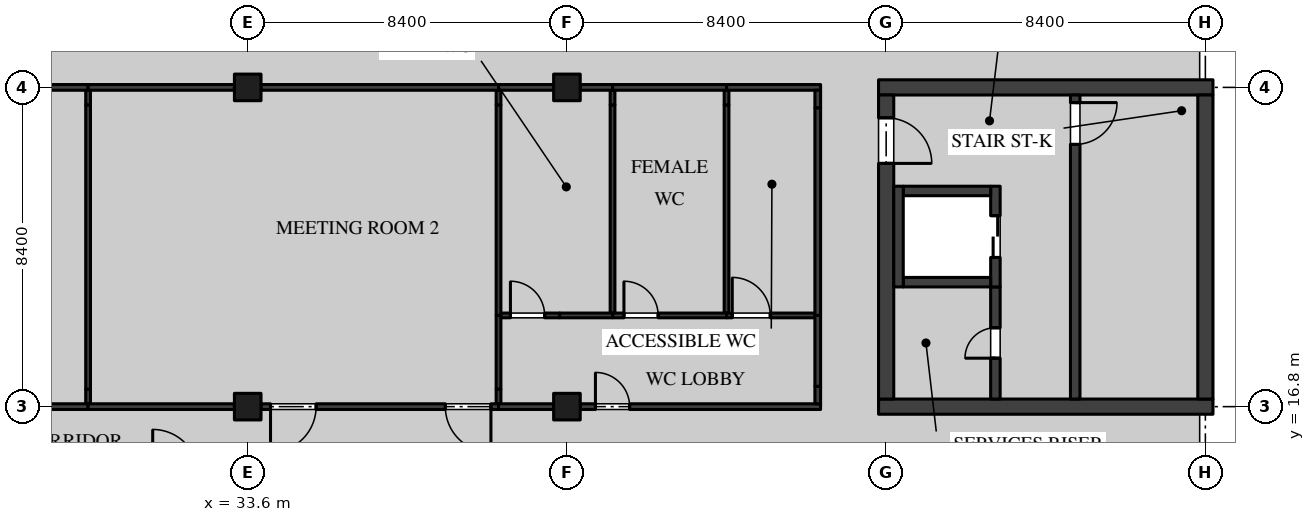
"""IFC4 building model, lengths in metres.
Left out: names, types, materials, properties, quantities, classifications, styles, units other than length and angle.
Written with IfcOpenShell. Run it as: python <this file> out.ifc"""

import sys

from ifc_helpers import new_model, si_unit, direction, frame, frame_2d, origin, origin_2d, place, context, subcontext, project, spatial, rectangle, extrude, element, fill, save


model = new_model("IFC4")
c1 = context("Model", 3, precision=1e-05, world=origin(), true_north=direction((0.0, 1.0)))
c2 = subcontext(c1, "Body", "Model", "MODEL_VIEW")
j1 = project(units=[si_unit("LENGTHUNIT", "METRE"), si_unit("PLANEANGLEUNIT", "RADIAN")], contexts=[c1])
p1 = place(None, origin())
s1 = spatial("IfcSite", under=j1, at=p1, CompositionType="ELEMENT")
p2 = place(p1, origin())
s2 = spatial("IfcBuilding", under=s1, at=p2, CompositionType="ELEMENT")
p3 = place(p2, frame((0.0, 0.0, 5.4)))
s3 = spatial("IfcBuildingStorey", under=s2, at=p3, CompositionType="ELEMENT", Elevation=5.4)
for number, where, z_axis, x_axis in (
    (1, (33.6, 16.8, 0.0), (0.0, 0.0, 1.0), (1.0, 0.0, 0.0)),
    (2, (33.6, 25.2, 0.0), (0.0, 0.0, 1.0), (1.0, 0.0, 0.0)),
    (3, (42.0, 16.8, 0.0), (0.0, 0.0, 1.0), (1.0, 0.0, 0.0)),
    (4, (42.0, 25.2, 0.0), (0.0, 0.0, 1.0), (1.0, 0.0, 0.0)),
):
    element("IfcColumn", number, at=place(p3, frame(where, z_axis=z_axis, x_axis=x_axis)), inside=s3, PredefinedType="COLUMN", context=c2, shape_type="SweptSolid", body=[
        extrude(rectangle(XDim=0.7, YDim=0.7, at=origin_2d()), origin(), (0.0, 0.0, 1.0), 4.37),
    ])
for number, where, z_axis, x_axis in (
    (5, (50.2, 16.8, 0.0), (0.0, 0.0, 1.0), (1.0, 0.0, 0.0)),
    (6, (50.2, 25.2, 0.0), (0.0, 0.0, 1.0), (1.0, 0.0, 0.0)),
):
    element("IfcWall", number, at=place(p3, frame(where, z_axis=z_axis, x_axis=x_axis)), inside=s3, PredefinedType="SHEAR", context=c2, shape_type="SweptSolid", body=[
        extrude(rectangle(XDim=8.8, YDim=0.4, at=frame_2d((4.4, 0.0))), origin(), (0.0, 0.0, 1.0), 4.37),
    ])
p4 = place(p3, frame((50.4, 17.0, 0.0), z_axis=(0.0, 0.0, 1.0), x_axis=(0.0, 1.0, 0.0)))
e7 = element("IfcWall", 7, at=p4, inside=s3, PredefinedType="SHEAR", context=c2, shape_type="SweptSolid", body=[
    extrude(rectangle(XDim=8.0, YDim=0.4, at=frame_2d((4.0, 0.0))), origin(), (0.0, 0.0, 1.0), 4.37),
])
p5 = place(p4, frame((6.2, 0.0, 0.0)))
e8 = element("IfcOpeningElement", 8, at=p5, cuts=e7, PredefinedType="OPENING", context=c2, shape_type="SweptSolid", body=[
    extrude(rectangle(XDim=1.2, YDim=2.1, at=frame_2d((0.6, 1.05))), frame((0.0, 0.21, 0.0), z_axis=(0.0, -1.0, 0.0), x_axis=(1.0, 0.0, 0.0)), (0.0, 0.0, 1.0), 0.42),
])
p6 = place(p3, frame((58.8, 17.0, 0.0), z_axis=(0.0, 0.0, 1.0), x_axis=(0.0, 1.0, 0.0)))
e9 = element("IfcWall", 9, at=p6, inside=s3, PredefinedType="SHEAR", context=c2, shape_type="SweptSolid", body=[
    extrude(rectangle(XDim=8.0, YDim=0.4, at=frame_2d((4.0, 0.0))), origin(), (0.0, 0.0, 1.0), 4.37),
])
p7 = place(p3, frame((55.375, 25.0, 0.0), z_axis=(0.0, 0.0, 1.0), x_axis=(0.0, -1.0, 0.0)))
e10 = element("IfcWall", 10, at=p7, inside=s3, PredefinedType="SOLIDWALL", context=c2, shape_type="SweptSolid", body=[
    extrude(rectangle(XDim=8.0, YDim=0.25, at=frame_2d((4.0, 0.0))), origin(), (0.0, 0.0, 1.0), 4.37),
])
p8 = place(p7, frame((0.2, 0.0, 0.0)))
e11 = element("IfcOpeningElement", 11, at=p8, cuts=e10, PredefinedType="OPENING", context=c2, shape_type="SweptSolid", body=[
    extrude(rectangle(XDim=1.1, YDim=2.1, at=frame_2d((0.55, 1.05))), frame((0.0, 0.135, 0.0), z_axis=(0.0, -1.0, 0.0), x_axis=(1.0, 0.0, 0.0)), (0.0, 0.0, 1.0), 0.27),
])
p9 = place(p3, frame((53.275, 19.95, 0.0), z_axis=(0.0, 0.0, 1.0), x_axis=(0.0, -1.0, 0.0)))
e12 = element("IfcWall", 12, at=p9, inside=s3, PredefinedType="SOLIDWALL", context=c2, shape_type="SweptSolid", body=[
    extrude(rectangle(XDim=2.95, YDim=0.25, at=frame_2d((1.475, 0.0))), origin(), (0.0, 0.0, 1.0), 4.37),
])
p10 = place(p9, frame((1.075, 0.0, 0.0)))
e13 = element("IfcOpeningElement", 13, at=p10, cuts=e12, PredefinedType="OPENING", context=c2, shape_type="SweptSolid", body=[
    extrude(rectangle(XDim=0.8, YDim=2.1, at=frame_2d((0.4, 1.05))), frame((0.0, 0.135, 0.0), z_axis=(0.0, -1.0, 0.0), x_axis=(1.0, 0.0, 0.0)), (0.0, 0.0, 1.0), 0.27),
])
p11 = place(p3, frame((53.275, 19.95, 0.0), z_axis=(0.0, 0.0, 1.0), x_axis=(0.0, 1.0, 0.0)))
e14 = element("IfcWall", 14, at=p11, inside=s3, PredefinedType="SOLIDWALL", context=c2, shape_type="SweptSolid", body=[
    extrude(rectangle(XDim=2.65, YDim=0.25, at=frame_2d((1.325, 0.0))), origin(), (0.0, 0.0, 1.0), 4.37),
])
p12 = place(p11, frame((0.775, 0.0, 0.0)))
e15 = element("IfcOpeningElement", 15, at=p12, cuts=e14, PredefinedType="OPENING", context=c2, shape_type="SweptSolid", body=[
    extrude(rectangle(XDim=1.1, YDim=2.1, at=frame_2d((0.55, 1.05))), frame((0.0, 0.135, 0.0), z_axis=(0.0, -1.0, 0.0), x_axis=(1.0, 0.0, 0.0)), (0.0, 0.0, 1.0), 0.27),
])
for number, where, z_axis, x_axis in (
    (16, (50.85, 22.475, 0.0), (0.0, 0.0, 1.0), (1.0, 0.0, 0.0)),
    (17, (50.85, 20.075, 0.0), (0.0, 0.0, 1.0), (1.0, 0.0, 0.0)),
):
    element("IfcWall", number, at=place(p3, frame(where, z_axis=z_axis, x_axis=x_axis)), inside=s3, PredefinedType="SOLIDWALL", context=c2, shape_type="SweptSolid", body=[
        extrude(rectangle(XDim=2.3, YDim=0.25, at=frame_2d((1.15, 0.0))), origin(), (0.0, 0.0, 1.0), 4.37),
    ])
p13 = place(p3, frame((50.725, 19.95, 0.0), z_axis=(0.0, 0.0, 1.0), x_axis=(0.0, 1.0, 0.0)))
e18 = element("IfcWall", 18, at=p13, inside=s3, PredefinedType="SOLIDWALL", context=c2, shape_type="SweptSolid", body=[
    extrude(rectangle(XDim=2.65, YDim=0.25, at=frame_2d((1.325, 0.0))), origin(), (0.0, 0.0, 1.0), 4.37),
])
p14 = place(p3, frame((29.4, 16.875, 0.0), z_axis=(0.0, 0.0, 1.0), x_axis=(0.0, 1.0, 0.0)))
e19 = element("IfcWall", 19, at=p14, inside=s3, PredefinedType="PARTITIONING", context=c2, shape_type="SweptSolid", body=[
    extrude(rectangle(XDim=0.385, YDim=0.125, at=frame_2d((0.192, 0.0))), origin(), (0.0, 0.0, 1.0), 3.746),
])
p15 = place(p3, frame((29.4, 17.26, 0.0), z_axis=(0.0, 0.0, 1.0), x_axis=(0.0, 1.0, 0.0)))
e20 = element("IfcWall", 20, at=p15, inside=s3, PredefinedType="PARTITIONING", context=c2, shape_type="SweptSolid", body=[
    extrude(rectangle(XDim=7.48, YDim=0.125, at=frame_2d((3.74, 0.0))), origin(), (0.0, 0.0, 1.0), 4.37),
])
p16 = place(p3, frame((29.4, 24.74, 0.0), z_axis=(0.0, 0.0, 1.0), x_axis=(0.0, 1.0, 0.0)))
e21 = element("IfcWall", 21, at=p16, inside=s3, PredefinedType="PARTITIONING", context=c2, shape_type="SweptSolid", body=[
    extrude(rectangle(XDim=0.385, YDim=0.125, at=frame_2d((0.192, 0.0))), origin(), (0.0, 0.0, 1.0), 3.746),
])
for number, where, z_axis, x_axis in (
    (22, (25.55, 16.8, 0.0), (0.0, 0.0, 1.0), (1.0, 0.0, 0.0)),
    (23, (25.55, 25.2, 0.0), (0.0, 0.0, 1.0), (1.0, 0.0, 0.0)),
):
    element("IfcWall", number, at=place(p3, frame(where, z_axis=z_axis, x_axis=x_axis)), inside=s3, PredefinedType="PARTITIONING", context=c2, shape_type="SweptSolid", body=[
        extrude(rectangle(XDim=3.85, YDim=0.15, at=frame_2d((1.925, 0.0))), origin(), (0.0, 0.0, 1.0), 3.746),
    ])
p17 = place(p3, frame((40.2, 16.875, 0.0), z_axis=(0.0, 0.0, 1.0), x_axis=(0.0, 1.0, 0.0)))
e24 = element("IfcWall", 24, at=p17, inside=s3, PredefinedType="PARTITIONING", context=c2, shape_type="SweptSolid", body=[
    extrude(rectangle(XDim=0.385, YDim=0.125, at=frame_2d((0.192, 0.0))), origin(), (0.0, 0.0, 1.0), 3.746),
])
p18 = place(p3, frame((40.2, 17.26, 0.0), z_axis=(0.0, 0.0, 1.0), x_axis=(0.0, 1.0, 0.0)))
e25 = element("IfcWall", 25, at=p18, inside=s3, PredefinedType="PARTITIONING", context=c2, shape_type="SweptSolid", body=[
    extrude(rectangle(XDim=1.94, YDim=0.125, at=frame_2d((0.97, 0.0))), origin(), (0.0, 0.0, 1.0), 4.37),
])
p19 = place(p3, frame((40.2, 19.2, 0.0), z_axis=(0.0, 0.0, 1.0), x_axis=(0.0, 1.0, 0.0)))
e26 = element("IfcWall", 26, at=p19, inside=s3, PredefinedType="PARTITIONING", context=c2, shape_type="SweptSolid", body=[
    extrude(rectangle(XDim=5.54, YDim=0.125, at=frame_2d((2.77, 0.0))), origin(), (0.0, 0.0, 1.0), 4.37),
])
p20 = place(p3, frame((40.2, 24.74, 0.0), z_axis=(0.0, 0.0, 1.0), x_axis=(0.0, 1.0, 0.0)))
e27 = element("IfcWall", 27, at=p20, inside=s3, PredefinedType="PARTITIONING", context=c2, shape_type="SweptSolid", body=[
    extrude(rectangle(XDim=0.385, YDim=0.125, at=frame_2d((0.192, 0.0))), origin(), (0.0, 0.0, 1.0), 3.746),
])
p21 = place(p3, frame((29.4, 16.8, 0.0), z_axis=(0.0, 0.0, 1.0), x_axis=(1.0, 0.0, 0.0)))
e28 = element("IfcWall", 28, at=p21, inside=s3, PredefinedType="PARTITIONING", context=c2, shape_type="SweptSolid", body=[
    extrude(rectangle(XDim=3.85, YDim=0.15, at=frame_2d((1.925, 0.0))), origin(), (0.0, 0.0, 1.0), 3.746),
])
p22 = place(p3, frame((33.95, 16.8, 0.0), z_axis=(0.0, 0.0, 1.0), x_axis=(1.0, 0.0, 0.0)))
e29 = element("IfcWall", 29, at=p22, inside=s3, PredefinedType="PARTITIONING", context=c2, shape_type="SweptSolid", body=[
    extrude(rectangle(XDim=6.25, YDim=0.15, at=frame_2d((3.125, 0.0))), origin(), (0.0, 0.0, 1.0), 3.746),
])
p23 = place(p22, frame((0.25, 0.0, 0.0)))
e30 = element("IfcOpeningElement", 30, at=p23, cuts=e29, PredefinedType="OPENING", context=c2, shape_type="SweptSolid", body=[
    extrude(rectangle(XDim=1.2, YDim=2.4, at=frame_2d((0.6, 1.2))), frame((0.0, 0.085, 0.0), z_axis=(0.0, -1.0, 0.0), x_axis=(1.0, 0.0, 0.0)), (0.0, 0.0, 1.0), 0.17),
])
p24 = place(p22, frame((4.85, 0.0, 0.0)))
e31 = element("IfcOpeningElement", 31, at=p24, cuts=e29, PredefinedType="OPENING", context=c2, shape_type="SweptSolid", body=[
    extrude(rectangle(XDim=1.2, YDim=2.4, at=frame_2d((0.6, 1.2))), frame((0.0, 0.085, 0.0), z_axis=(0.0, -1.0, 0.0), x_axis=(1.0, 0.0, 0.0)), (0.0, 0.0, 1.0), 0.17),
])
p25 = place(p3, frame((29.4, 25.2, 0.0), z_axis=(0.0, 0.0, 1.0), x_axis=(1.0, 0.0, 0.0)))
e32 = element("IfcWall", 32, at=p25, inside=s3, PredefinedType="PARTITIONING", context=c2, shape_type="SweptSolid", body=[
    extrude(rectangle(XDim=3.85, YDim=0.15, at=frame_2d((1.925, 0.0))), origin(), (0.0, 0.0, 1.0), 3.746),
])
p26 = place(p3, frame((33.95, 25.2, 0.0), z_axis=(0.0, 0.0, 1.0), x_axis=(1.0, 0.0, 0.0)))
e33 = element("IfcWall", 33, at=p26, inside=s3, PredefinedType="PARTITIONING", context=c2, shape_type="SweptSolid", body=[
    extrude(rectangle(XDim=6.25, YDim=0.15, at=frame_2d((3.125, 0.0))), origin(), (0.0, 0.0, 1.0), 3.746),
])
p27 = place(p3, frame((46.2, 19.262, 0.0), z_axis=(0.0, 0.0, 1.0), x_axis=(0.0, 1.0, 0.0)))
e34 = element("IfcWall", 34, at=p27, inside=s3, PredefinedType="PARTITIONING", context=c2, shape_type="SweptSolid", body=[
    extrude(rectangle(XDim=5.478, YDim=0.125, at=frame_2d((2.739, 0.0))), origin(), (0.0, 0.0, 1.0), 4.37),
])
p28 = place(p3, frame((46.2, 24.74, 0.0), z_axis=(0.0, 0.0, 1.0), x_axis=(0.0, 1.0, 0.0)))
e35 = element("IfcWall", 35, at=p28, inside=s3, PredefinedType="PARTITIONING", context=c2, shape_type="SweptSolid", body=[
    extrude(rectangle(XDim=0.385, YDim=0.125, at=frame_2d((0.192, 0.0))), origin(), (0.0, 0.0, 1.0), 3.746),
])
p29 = place(p3, frame((46.2, 19.2, 0.0), z_axis=(0.0, 0.0, 1.0), x_axis=(1.0, 0.0, 0.0)))
e36 = element("IfcWall", 36, at=p29, inside=s3, PredefinedType="PARTITIONING", context=c2, shape_type="SweptSolid", body=[
    extrude(rectangle(XDim=2.325, YDim=0.125, at=frame_2d((1.163, 0.0))), origin(), (0.0, 0.0, 1.0), 3.895),
])
p30 = place(p29, frame((0.15, 0.0, 0.0)))
e37 = element("IfcOpeningElement", 37, at=p30, cuts=e36, PredefinedType="OPENING", context=c2, shape_type="SweptSolid", body=[
    extrude(rectangle(XDim=1.0, YDim=2.1, at=frame_2d((0.5, 1.05))), frame((0.0, 0.073, 0.0), z_axis=(0.0, -1.0, 0.0), x_axis=(1.0, 0.0, 0.0)), (0.0, 0.0, 1.0), 0.145),
])
p31 = place(p3, frame((46.2, 25.2, 0.0), z_axis=(0.0, 0.0, 1.0), x_axis=(1.0, 0.0, 0.0)))
e38 = element("IfcWall", 38, at=p31, inside=s3, PredefinedType="PARTITIONING", context=c2, shape_type="SweptSolid", body=[
    extrude(rectangle(XDim=2.475, YDim=0.15, at=frame_2d((1.238, 0.0))), origin(), (0.0, 0.0, 1.0), 3.746),
])
p32 = place(p3, frame((48.6, 19.2, 0.0), z_axis=(0.0, 0.0, 1.0), x_axis=(0.0, 1.0, 0.0)))
e39 = element("IfcWall", 39, at=p32, inside=s3, PredefinedType="PARTITIONING", context=c2, shape_type="SweptSolid", body=[
    extrude(rectangle(XDim=5.465, YDim=0.15, at=frame_2d((2.732, 0.0))), origin(), (0.0, 0.0, 1.0), 4.37),
])
p33 = place(p3, frame((48.6, 24.665, 0.0), z_axis=(0.0, 0.0, 1.0), x_axis=(0.0, 1.0, 0.0)))
e40 = element("IfcWall", 40, at=p33, inside=s3, PredefinedType="PARTITIONING", context=c2, shape_type="SweptSolid", body=[
    extrude(rectangle(XDim=0.46, YDim=0.15, at=frame_2d((0.23, 0.0))), origin(), (0.0, 0.0, 1.0), 3.746),
])
p34 = place(p3, frame((43.2, 19.2, 0.0), z_axis=(0.0, 0.0, 1.0), x_axis=(1.0, 0.0, 0.0)))
e41 = element("IfcWall", 41, at=p34, inside=s3, PredefinedType="PARTITIONING", context=c2, shape_type="SweptSolid", body=[
    extrude(rectangle(XDim=3.0, YDim=0.125, at=frame_2d((1.5, 0.0))), origin(), (0.0, 0.0, 1.0), 3.895),
])
p35 = place(p34, frame((0.3, 0.0, 0.0)))
e42 = element("IfcOpeningElement", 42, at=p35, cuts=e41, PredefinedType="OPENING", context=c2, shape_type="SweptSolid", body=[
    extrude(rectangle(XDim=0.9, YDim=2.1, at=frame_2d((0.45, 1.05))), frame((0.0, 0.073, 0.0), z_axis=(0.0, -1.0, 0.0), x_axis=(1.0, 0.0, 0.0)), (0.0, 0.0, 1.0), 0.145),
])
p36 = place(p3, frame((43.2, 19.262, 0.0), z_axis=(0.0, 0.0, 1.0), x_axis=(0.0, 1.0, 0.0)))
e43 = element("IfcWall", 43, at=p36, inside=s3, PredefinedType="PARTITIONING", context=c2, shape_type="SweptSolid", body=[
    extrude(rectangle(XDim=5.478, YDim=0.125, at=frame_2d((2.739, 0.0))), origin(), (0.0, 0.0, 1.0), 4.37),
])
p37 = place(p3, frame((43.2, 24.74, 0.0), z_axis=(0.0, 0.0, 1.0), x_axis=(0.0, 1.0, 0.0)))
e44 = element("IfcWall", 44, at=p37, inside=s3, PredefinedType="PARTITIONING", context=c2, shape_type="SweptSolid", body=[
    extrude(rectangle(XDim=0.385, YDim=0.125, at=frame_2d((0.192, 0.0))), origin(), (0.0, 0.0, 1.0), 3.746),
])
p38 = place(p3, frame((43.2, 25.2, 0.0), z_axis=(0.0, 0.0, 1.0), x_axis=(1.0, 0.0, 0.0)))
e45 = element("IfcWall", 45, at=p38, inside=s3, PredefinedType="PARTITIONING", context=c2, shape_type="SweptSolid", body=[
    extrude(rectangle(XDim=3.0, YDim=0.15, at=frame_2d((1.5, 0.0))), origin(), (0.0, 0.0, 1.0), 3.746),
])
p39 = place(p3, frame((40.263, 19.2, 0.0), z_axis=(0.0, 0.0, 1.0), x_axis=(1.0, 0.0, 0.0)))
e46 = element("IfcWall", 46, at=p39, inside=s3, PredefinedType="PARTITIONING", context=c2, shape_type="SweptSolid", body=[
    extrude(rectangle(XDim=1.544, YDim=0.125, at=frame_2d((0.772, 0.0))), origin(), (0.0, 0.0, 1.0), 4.37),
])
p40 = place(p39, frame((0.25, 0.0, 0.0)))
e47 = element("IfcOpeningElement", 47, at=p40, cuts=e46, PredefinedType="OPENING", context=c2, shape_type="SweptSolid", body=[
    extrude(rectangle(XDim=0.9, YDim=2.1, at=frame_2d((0.45, 1.05))), frame((0.0, 0.073, 0.0), z_axis=(0.0, -1.0, 0.0), x_axis=(1.0, 0.0, 0.0)), (0.0, 0.0, 1.0), 0.145),
])
p41 = place(p3, frame((41.807, 19.2, 0.0), z_axis=(0.0, 0.0, 1.0), x_axis=(1.0, 0.0, 0.0)))
e48 = element("IfcWall", 48, at=p41, inside=s3, PredefinedType="PARTITIONING", context=c2, shape_type="SweptSolid", body=[
    extrude(rectangle(XDim=1.393, YDim=0.125, at=frame_2d((0.697, 0.0))), origin(), (0.0, 0.0, 1.0), 3.746),
])
p42 = place(p3, frame((40.2, 16.8, 0.0), z_axis=(0.0, 0.0, 1.0), x_axis=(1.0, 0.0, 0.0)))
e49 = element("IfcWall", 49, at=p42, inside=s3, PredefinedType="PARTITIONING", context=c2, shape_type="SweptSolid", body=[
    extrude(rectangle(XDim=1.45, YDim=0.15, at=frame_2d((0.725, 0.0))), origin(), (0.0, 0.0, 1.0), 3.746),
])
p43 = place(p3, frame((42.35, 16.8, 0.0), z_axis=(0.0, 0.0, 1.0), x_axis=(1.0, 0.0, 0.0)))
e50 = element("IfcWall", 50, at=p43, inside=s3, PredefinedType="PARTITIONING", context=c2, shape_type="SweptSolid", body=[
    extrude(rectangle(XDim=6.325, YDim=0.15, at=frame_2d((3.163, 0.0))), origin(), (0.0, 0.0, 1.0), 3.746),
])
p44 = place(p43, frame((0.4, 0.0, 0.0)))
e51 = element("IfcOpeningElement", 51, at=p44, cuts=e50, PredefinedType="OPENING", context=c2, shape_type="SweptSolid", body=[
    extrude(rectangle(XDim=0.9, YDim=2.1, at=frame_2d((0.45, 1.05))), frame((0.0, 0.085, 0.0), z_axis=(0.0, -1.0, 0.0), x_axis=(1.0, 0.0, 0.0)), (0.0, 0.0, 1.0), 0.17),
])
p45 = place(p3, frame((48.6, 16.875, 0.0), z_axis=(0.0, 0.0, 1.0), x_axis=(0.0, 1.0, 0.0)))
e52 = element("IfcWall", 52, at=p45, inside=s3, PredefinedType="PARTITIONING", context=c2, shape_type="SweptSolid", body=[
    extrude(rectangle(XDim=0.46, YDim=0.15, at=frame_2d((0.23, 0.0))), origin(), (0.0, 0.0, 1.0), 3.746),
])
p46 = place(p3, frame((48.6, 17.335, 0.0), z_axis=(0.0, 0.0, 1.0), x_axis=(0.0, 1.0, 0.0)))
e53 = element("IfcWall", 53, at=p46, inside=s3, PredefinedType="PARTITIONING", context=c2, shape_type="SweptSolid", body=[
    extrude(rectangle(XDim=1.865, YDim=0.15, at=frame_2d((0.933, 0.0))), origin(), (0.0, 0.0, 1.0), 4.37),
])
p47 = place(p3, frame((40.2, 25.2, 0.0), z_axis=(0.0, 0.0, 1.0), x_axis=(1.0, 0.0, 0.0)))
e54 = element("IfcWall", 54, at=p47, inside=s3, PredefinedType="PARTITIONING", context=c2, shape_type="SweptSolid", body=[
    extrude(rectangle(XDim=1.45, YDim=0.15, at=frame_2d((0.725, 0.0))), origin(), (0.0, 0.0, 1.0), 3.746),
])
p48 = place(p3, frame((42.35, 25.2, 0.0), z_axis=(0.0, 0.0, 1.0), x_axis=(1.0, 0.0, 0.0)))
e55 = element("IfcWall", 55, at=p48, inside=s3, PredefinedType="PARTITIONING", context=c2, shape_type="SweptSolid", body=[
    extrude(rectangle(XDim=0.85, YDim=0.15, at=frame_2d((0.425, 0.0))), origin(), (0.0, 0.0, 1.0), 3.746),
])
p49 = place(p5, frame((1.2, 0.0, 0.0), z_axis=(0.0, 0.0, 1.0), x_axis=(-1.0, 0.0, 0.0)))
e56 = element("IfcDoor", 56, at=p49, inside=s3, OperationType="SINGLE_SWING_LEFT", PredefinedType="DOOR", context=c2, shape_type="SweptSolid", body=[
    extrude(rectangle(XDim=1.2, YDim=2.1, at=frame_2d((0.6, 1.05))), frame((0.0, 0.035, 0.0), z_axis=(0.0, -1.0, 0.0), x_axis=(1.0, 0.0, 0.0)), (0.0, 0.0, 1.0), 0.07),
])
fill(e8, e56)
p50 = place(p10, frame((0.8, 0.0, 0.0), z_axis=(0.0, 0.0, 1.0), x_axis=(-1.0, 0.0, 0.0)))
e57 = element("IfcDoor", 57, at=p50, inside=s3, OperationType="SINGLE_SWING_RIGHT", PredefinedType="DOOR", context=c2, shape_type="SweptSolid", body=[
    extrude(rectangle(XDim=0.8, YDim=2.1, at=frame_2d((0.4, 1.05))), frame((0.0, 0.035, 0.0), z_axis=(0.0, -1.0, 0.0), x_axis=(1.0, 0.0, 0.0)), (0.0, 0.0, 1.0), 0.07),
])
fill(e13, e57)
p51 = place(p8, origin())
e58 = element("IfcDoor", 58, at=p51, inside=s3, OperationType="SINGLE_SWING_RIGHT", PredefinedType="DOOR", context=c2, shape_type="SweptSolid", body=[
    extrude(rectangle(XDim=1.1, YDim=2.1, at=frame_2d((0.55, 1.05))), frame((0.0, 0.035, 0.0), z_axis=(0.0, -1.0, 0.0), x_axis=(1.0, 0.0, 0.0)), (0.0, 0.0, 1.0), 0.07),
])
fill(e11, e58)
p52 = place(p12, origin())
e59 = element("IfcDoor", 59, at=p52, inside=s3, OperationType="DOUBLE_DOOR_SLIDING", PredefinedType="DOOR", context=c2, shape_type="SweptSolid", body=[
    extrude(rectangle(XDim=1.1, YDim=2.1, at=frame_2d((0.55, 1.05))), frame((0.0, 0.04, 0.0), z_axis=(0.0, -1.0, 0.0), x_axis=(1.0, 0.0, 0.0)), (0.0, 0.0, 1.0), 0.08),
])
fill(e15, e59)
p53 = place(p23, frame((1.2, 0.0, 0.0), z_axis=(0.0, 0.0, 1.0), x_axis=(-1.0, 0.0, 0.0)))
e60 = element("IfcDoor", 60, at=p53, inside=s3, OperationType="SINGLE_SWING_LEFT", PredefinedType="DOOR", context=c2, shape_type="SweptSolid", body=[
    extrude(rectangle(XDim=1.2, YDim=2.4, at=frame_2d((0.6, 1.2))), frame((0.0, 0.025, 0.0), z_axis=(0.0, -1.0, 0.0), x_axis=(1.0, 0.0, 0.0)), (0.0, 0.0, 1.0), 0.05),
])
fill(e30, e60)
p54 = place(p24, frame((1.2, 0.0, 0.0), z_axis=(0.0, 0.0, 1.0), x_axis=(-1.0, 0.0, 0.0)))
e61 = element("IfcDoor", 61, at=p54, inside=s3, OperationType="SINGLE_SWING_RIGHT", PredefinedType="DOOR", context=c2, shape_type="SweptSolid", body=[
    extrude(rectangle(XDim=1.2, YDim=2.4, at=frame_2d((0.6, 1.2))), frame((0.0, 0.025, 0.0), z_axis=(0.0, -1.0, 0.0), x_axis=(1.0, 0.0, 0.0)), (0.0, 0.0, 1.0), 0.05),
])
fill(e31, e61)
p55 = place(p30, origin())
e62 = element("IfcDoor", 62, at=p55, inside=s3, OperationType="SINGLE_SWING_RIGHT", PredefinedType="DOOR", context=c2, shape_type="SweptSolid", body=[
    extrude(rectangle(XDim=1.0, YDim=2.1, at=frame_2d((0.5, 1.05))), frame((0.0, 0.02, 0.0), z_axis=(0.0, -1.0, 0.0), x_axis=(1.0, 0.0, 0.0)), (0.0, 0.0, 1.0), 0.04),
])
fill(e37, e62)
p56 = place(p35, origin())
e63 = element("IfcDoor", 63, at=p56, inside=s3, OperationType="SINGLE_SWING_RIGHT", PredefinedType="DOOR", context=c2, shape_type="SweptSolid", body=[
    extrude(rectangle(XDim=0.9, YDim=2.1, at=frame_2d((0.45, 1.05))), frame((0.0, 0.02, 0.0), z_axis=(0.0, -1.0, 0.0), x_axis=(1.0, 0.0, 0.0)), (0.0, 0.0, 1.0), 0.04),
])
fill(e42, e63)
p57 = place(p44, origin())
e64 = element("IfcDoor", 64, at=p57, inside=s3, OperationType="SINGLE_SWING_RIGHT", PredefinedType="DOOR", context=c2, shape_type="SweptSolid", body=[
    extrude(rectangle(XDim=0.9, YDim=2.1, at=frame_2d((0.45, 1.05))), frame((0.0, 0.025, 0.0), z_axis=(0.0, -1.0, 0.0), x_axis=(1.0, 0.0, 0.0)), (0.0, 0.0, 1.0), 0.05),
])
fill(e51, e64)
p58 = place(p40, origin())
e65 = element("IfcDoor", 65, at=p58, inside=s3, OperationType="SINGLE_SWING_RIGHT", PredefinedType="DOOR", context=c2, shape_type="SweptSolid", body=[
    extrude(rectangle(XDim=0.9, YDim=2.1, at=frame_2d((0.45, 1.05))), frame((0.0, 0.02, 0.0), z_axis=(0.0, -1.0, 0.0), x_axis=(1.0, 0.0, 0.0)), (0.0, 0.0, 1.0), 0.04),
])
fill(e47, e65)
save(model, sys.argv[1])
